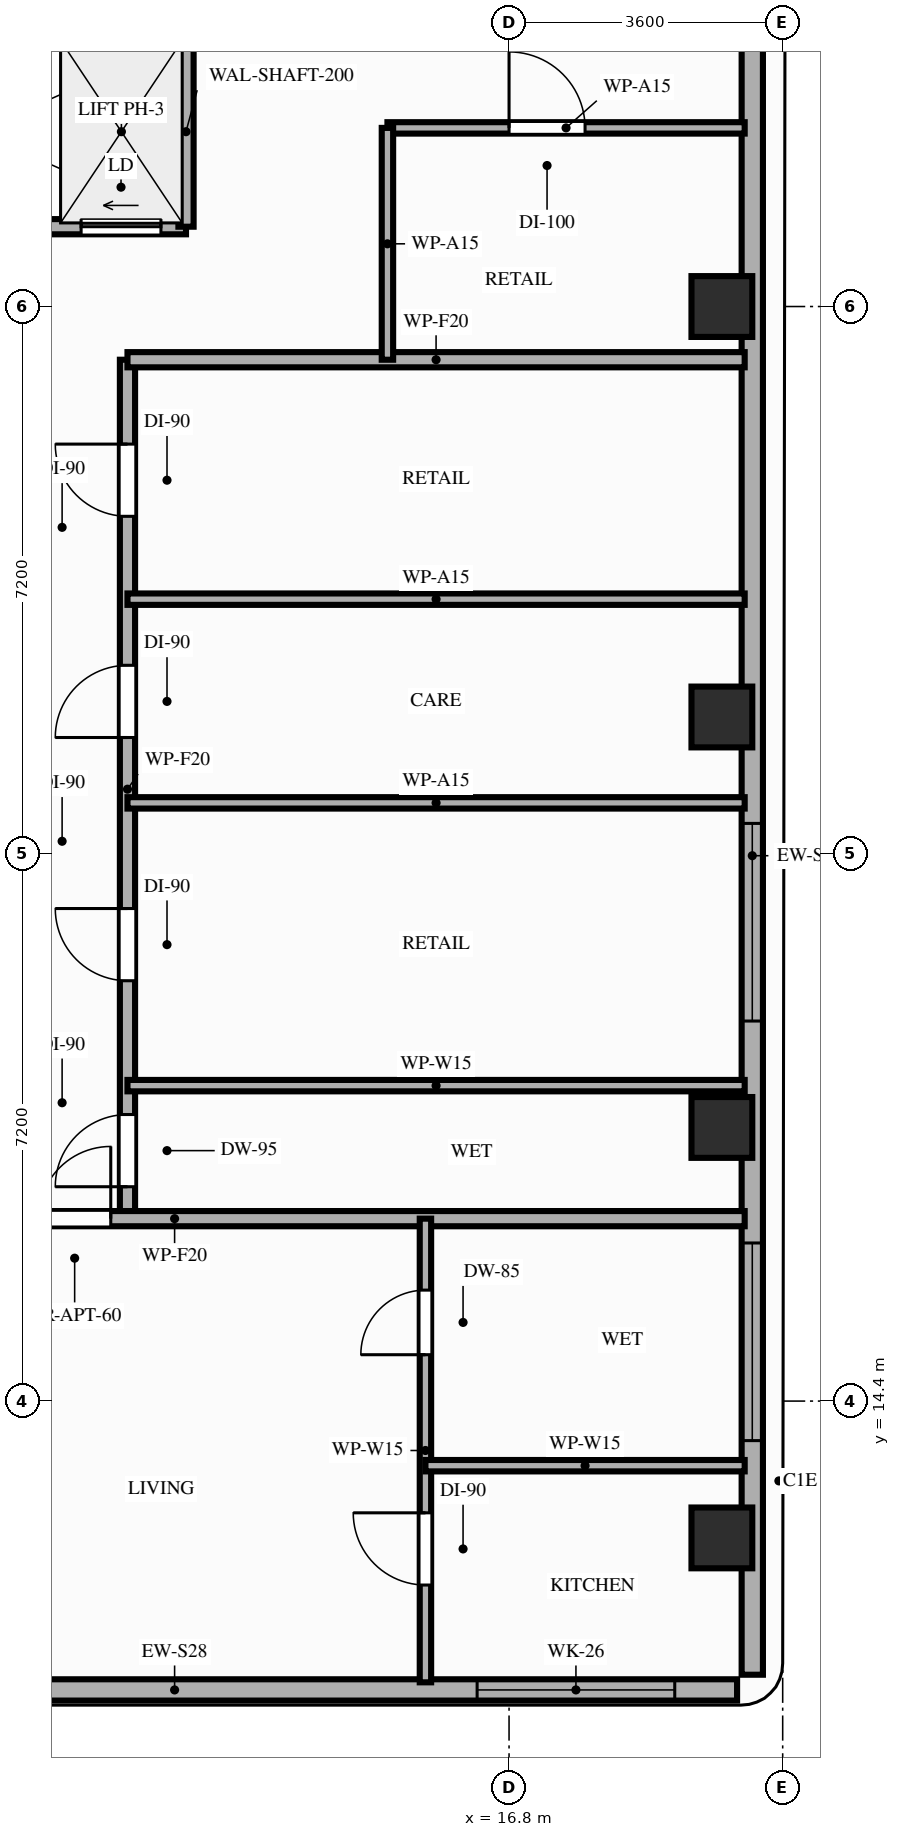
"""IFC4 building model, lengths in metres.
Left out: names, types, materials, properties, quantities, classifications, styles, units other than length and angle.
Written with IfcOpenShell. Run it as: python <this file> out.ifc"""

import sys

from ifc_helpers import new_model, si_unit, direction, frame, frame_2d, origin, origin_2d, place, context, subcontext, project, spatial, rectangle, extrude, element, fill, save


model = new_model("IFC4")
c1 = context("Model", 3, precision=1e-05, world=origin(), true_north=direction((0.0, 1.0)))
c2 = subcontext(c1, "Body", "Model", "MODEL_VIEW")
j1 = project(units=[si_unit("LENGTHUNIT", "METRE"), si_unit("PLANEANGLEUNIT", "RADIAN")], contexts=[c1])
p1 = place(None, origin())
s1 = spatial("IfcSite", under=j1, at=p1, CompositionType="ELEMENT")
p2 = place(p1, origin())
s2 = spatial("IfcBuilding", under=s1, at=p2, CompositionType="ELEMENT")
p3 = place(p2, frame((0.0, 0.0, 234.4)))
s3 = spatial("IfcBuildingStorey", under=s2, at=p3, CompositionType="ELEMENT", Elevation=234.4)
for number, where, z_axis, x_axis in (
    (1, (19.6, 12.6, 0.0), (0.0, 0.0, 1.0), (1.0, 0.0, 0.0)),
    (2, (19.6, 18.0, 0.0), (0.0, 0.0, 1.0), (1.0, 0.0, 0.0)),
    (3, (19.6, 23.4, 0.0), (0.0, 0.0, 1.0), (1.0, 0.0, 0.0)),
    (4, (19.6, 28.8, 0.0), (0.0, 0.0, 1.0), (1.0, 0.0, 0.0)),
):
    element("IfcColumn", number, at=place(p3, frame(where, z_axis=z_axis, x_axis=x_axis)), inside=s3, PredefinedType="COLUMN", context=c2, shape_type="SweptSolid", body=[
        extrude(rectangle(XDim=0.8, YDim=0.8, at=origin_2d()), origin(), (0.0, 0.0, 1.0), 3.2),
    ])
p4 = place(p3, frame((5.0, 10.6, 0.0), z_axis=(0.0, 0.0, 1.0), x_axis=(1.0, 0.0, 0.0)))
e5 = element("IfcWall", 5, at=p4, inside=s3, PredefinedType="STANDARD", context=c2, shape_type="SweptSolid", body=[
    extrude(rectangle(XDim=14.8, YDim=0.28, at=frame_2d((7.4, 0.0))), origin(), (0.0, 0.0, 1.0), 3.02),
])
p5 = place(p4, frame((11.38, 0.0, 0.85)))
e6 = element("IfcOpeningElement", 6, at=p5, cuts=e5, PredefinedType="OPENING", context=c2, shape_type="SweptSolid", body=[
    extrude(rectangle(XDim=2.6, YDim=1.92, at=frame_2d((1.3, 0.96))), frame((0.0, 0.15, 0.0), z_axis=(0.0, -1.0, 0.0), x_axis=(1.0, 0.0, 0.0)), (0.0, 0.0, 1.0), 0.3),
])
p6 = place(p3, frame((20.0, 10.8, 0.0), z_axis=(0.0, 0.0, 1.0), x_axis=(0.0, 1.0, 0.0)))
e7 = element("IfcWall", 7, at=p6, inside=s3, PredefinedType="STANDARD", context=c2, shape_type="SweptSolid", body=[
    extrude(rectangle(XDim=21.55, YDim=0.28, at=frame_2d((10.775, 0.0))), origin(), (0.0, 0.0, 1.0), 2.55),
])
p7 = place(p6, frame((3.08, 0.0, 0.85)))
e8 = element("IfcOpeningElement", 8, at=p7, cuts=e7, PredefinedType="OPENING", context=c2, shape_type="SweptSolid", body=[
    extrude(rectangle(XDim=2.6, YDim=1.45, at=frame_2d((1.3, 0.725))), frame((0.0, 0.15, 0.0), z_axis=(0.0, -1.0, 0.0), x_axis=(1.0, 0.0, 0.0)), (0.0, 0.0, 1.0), 0.3),
])
p8 = place(p6, frame((8.6, 0.0, 0.85)))
e9 = element("IfcOpeningElement", 9, at=p8, cuts=e7, PredefinedType="OPENING", context=c2, shape_type="SweptSolid", body=[
    extrude(rectangle(XDim=2.6, YDim=1.45, at=frame_2d((1.3, 0.725))), frame((0.0, 0.15, 0.0), z_axis=(0.0, -1.0, 0.0), x_axis=(1.0, 0.0, 0.0)), (0.0, 0.0, 1.0), 0.3),
])
p9 = place(p3, frame((7.0, 29.85, 0.0), z_axis=(0.0, 0.0, 1.0), x_axis=(1.0, 0.0, 0.0)))
e10 = element("IfcWall", 10, at=p9, inside=s3, PredefinedType="MOVABLE", context=c2, shape_type="SweptSolid", body=[
    extrude(rectangle(XDim=5.55, YDim=0.2, at=frame_2d((2.775, 0.0))), origin(), (0.0, 0.0, 1.0), 3.02),
])
p10 = place(p9, frame((0.38, 0.0, 0.0)))
e11 = element("IfcOpeningElement", 11, at=p10, cuts=e10, PredefinedType="OPENING", context=c2, shape_type="SweptSolid", body=[
    extrude(rectangle(XDim=1.05, YDim=2.15, at=frame_2d((0.525, 1.075))), frame((0.0, 0.11, 0.0), z_axis=(0.0, -1.0, 0.0), x_axis=(1.0, 0.0, 0.0)), (0.0, 0.0, 1.0), 0.22),
])
p11 = place(p9, frame((2.28, 0.0, 0.0)))
e12 = element("IfcOpeningElement", 12, at=p11, cuts=e10, PredefinedType="OPENING", context=c2, shape_type="SweptSolid", body=[
    extrude(rectangle(XDim=1.05, YDim=2.15, at=frame_2d((0.525, 1.075))), frame((0.0, 0.11, 0.0), z_axis=(0.0, -1.0, 0.0), x_axis=(1.0, 0.0, 0.0)), (0.0, 0.0, 1.0), 0.22),
])
p12 = place(p9, frame((4.17, 0.0, 0.0)))
e13 = element("IfcOpeningElement", 13, at=p12, cuts=e10, PredefinedType="OPENING", context=c2, shape_type="SweptSolid", body=[
    extrude(rectangle(XDim=1.05, YDim=2.15, at=frame_2d((0.525, 1.075))), frame((0.0, 0.11, 0.0), z_axis=(0.0, -1.0, 0.0), x_axis=(1.0, 0.0, 0.0)), (0.0, 0.0, 1.0), 0.22),
])
p13 = place(p3, frame((12.55, 29.85, 0.0), z_axis=(0.0, 0.0, 1.0), x_axis=(0.0, 1.0, 0.0)))
e14 = element("IfcWall", 14, at=p13, inside=s3, PredefinedType="MOVABLE", context=c2, shape_type="SweptSolid", body=[
    extrude(rectangle(XDim=2.5, YDim=0.2, at=frame_2d((1.25, 0.0))), origin(), (0.0, 0.0, 1.0), 3.02),
])
p14 = place(p3, frame((11.78, 16.8, 0.0), z_axis=(0.0, 0.0, 1.0), x_axis=(0.0, 1.0, 0.0)))
e15 = element("IfcWall", 15, at=p14, inside=s3, PredefinedType="PARTITIONING", context=c2, shape_type="SweptSolid", body=[
    extrude(rectangle(XDim=11.3, YDim=0.2, at=frame_2d((5.65, 0.0))), origin(), (0.0, 0.0, 1.0), 2.55),
])
p15 = place(p14, frame((0.42, 0.0, 0.0)))
e16 = element("IfcOpeningElement", 16, at=p15, cuts=e15, PredefinedType="OPENING", context=c2, shape_type="SweptSolid", body=[
    extrude(rectangle(XDim=0.95, YDim=2.1, at=frame_2d((0.475, 1.05))), frame((0.0, 0.11, 0.0), z_axis=(0.0, -1.0, 0.0), x_axis=(1.0, 0.0, 0.0)), (0.0, 0.0, 1.0), 0.22),
])
p16 = place(p14, frame((3.13, 0.0, 0.0)))
e17 = element("IfcOpeningElement", 17, at=p16, cuts=e15, PredefinedType="OPENING", context=c2, shape_type="SweptSolid", body=[
    extrude(rectangle(XDim=0.95, YDim=2.15, at=frame_2d((0.475, 1.075))), frame((0.0, 0.11, 0.0), z_axis=(0.0, -1.0, 0.0), x_axis=(1.0, 0.0, 0.0)), (0.0, 0.0, 1.0), 0.22),
])
p17 = place(p14, frame((6.33, 0.0, 0.0)))
e18 = element("IfcOpeningElement", 18, at=p17, cuts=e15, PredefinedType="OPENING", context=c2, shape_type="SweptSolid", body=[
    extrude(rectangle(XDim=0.95, YDim=2.15, at=frame_2d((0.475, 1.075))), frame((0.0, 0.11, 0.0), z_axis=(0.0, -1.0, 0.0), x_axis=(1.0, 0.0, 0.0)), (0.0, 0.0, 1.0), 0.22),
])
p18 = place(p14, frame((9.24, 0.0, 0.0)))
e19 = element("IfcOpeningElement", 19, at=p18, cuts=e15, PredefinedType="OPENING", context=c2, shape_type="SweptSolid", body=[
    extrude(rectangle(XDim=0.95, YDim=2.15, at=frame_2d((0.475, 1.075))), frame((0.0, 0.11, 0.0), z_axis=(0.0, -1.0, 0.0), x_axis=(1.0, 0.0, 0.0)), (0.0, 0.0, 1.0), 0.22),
])
p19 = place(p3, frame((4.9, 16.8, 0.0), z_axis=(0.0, 0.0, 1.0), x_axis=(1.0, 0.0, 0.0)))
e20 = element("IfcWall", 20, at=p19, inside=s3, PredefinedType="PARTITIONING", context=c2, shape_type="SweptSolid", body=[
    extrude(rectangle(XDim=15.0, YDim=0.2, at=frame_2d((7.5, 0.0))), origin(), (0.0, 0.0, 1.0), 2.55),
])
p20 = place(p19, frame((5.71, 0.0, 0.0)))
e21 = element("IfcOpeningElement", 21, at=p20, cuts=e20, PredefinedType="OPENING", context=c2, shape_type="SweptSolid", body=[
    extrude(rectangle(XDim=0.95, YDim=2.15, at=frame_2d((0.475, 1.075))), frame((0.0, 0.11, 0.0), z_axis=(0.0, -1.0, 0.0), x_axis=(1.0, 0.0, 0.0)), (0.0, 0.0, 1.0), 0.22),
])
p21 = place(p3, frame((11.78, 28.1, 0.0), z_axis=(0.0, 0.0, 1.0), x_axis=(1.0, 0.0, 0.0)))
e22 = element("IfcWall", 22, at=p21, inside=s3, PredefinedType="PARTITIONING", context=c2, shape_type="SweptSolid", body=[
    extrude(rectangle(XDim=8.12, YDim=0.2, at=frame_2d((4.06, 0.0))), origin(), (0.0, 0.0, 1.0), 2.55),
])
p22 = place(p3, frame((15.2, 31.15, 0.0), z_axis=(0.0, 0.0, 1.0), x_axis=(1.0, 0.0, 0.0)))
e23 = element("IfcWall", 23, at=p22, inside=s3, PredefinedType="PARTITIONING", context=c2, shape_type="SweptSolid", body=[
    extrude(rectangle(XDim=4.7, YDim=0.15, at=frame_2d((2.35, 0.0))), origin(), (0.0, 0.0, 1.0), 2.55),
])
p23 = place(p22, frame((1.6, 0.0, 0.0)))
e24 = element("IfcOpeningElement", 24, at=p23, cuts=e23, PredefinedType="OPENING", context=c2, shape_type="SweptSolid", body=[
    extrude(rectangle(XDim=1.0, YDim=2.15, at=frame_2d((0.5, 1.075))), frame((0.0, 0.085, 0.0), z_axis=(0.0, -1.0, 0.0), x_axis=(1.0, 0.0, 0.0)), (0.0, 0.0, 1.0), 0.17),
])
p24 = place(p3, frame((15.2, 28.1, 0.0), z_axis=(0.0, 0.0, 1.0), x_axis=(0.0, 1.0, 0.0)))
e25 = element("IfcWall", 25, at=p24, inside=s3, PredefinedType="PARTITIONING", context=c2, shape_type="SweptSolid", body=[
    extrude(rectangle(XDim=3.05, YDim=0.15, at=frame_2d((1.525, 0.0))), origin(), (0.0, 0.0, 1.0), 2.55),
])
p25 = place(p3, frame((15.7, 10.7, 0.0), z_axis=(0.0, 0.0, 1.0), x_axis=(0.0, 1.0, 0.0)))
e26 = element("IfcWall", 26, at=p25, inside=s3, PredefinedType="PARTITIONING", context=c2, shape_type="SweptSolid", body=[
    extrude(rectangle(XDim=6.1, YDim=0.15, at=frame_2d((3.05, 0.0))), origin(), (0.0, 0.0, 1.0), 2.55),
])
p26 = place(p25, frame((1.28, 0.0, 0.0)))
e27 = element("IfcOpeningElement", 27, at=p26, cuts=e26, PredefinedType="OPENING", context=c2, shape_type="SweptSolid", body=[
    extrude(rectangle(XDim=0.95, YDim=2.15, at=frame_2d((0.475, 1.075))), frame((0.0, 0.085, 0.0), z_axis=(0.0, -1.0, 0.0), x_axis=(1.0, 0.0, 0.0)), (0.0, 0.0, 1.0), 0.17),
])
p27 = place(p25, frame((4.31, 0.0, 0.0)))
e28 = element("IfcOpeningElement", 28, at=p27, cuts=e26, PredefinedType="OPENING", context=c2, shape_type="SweptSolid", body=[
    extrude(rectangle(XDim=0.85, YDim=2.1, at=frame_2d((0.425, 1.05))), frame((0.0, 0.085, 0.0), z_axis=(0.0, -1.0, 0.0), x_axis=(1.0, 0.0, 0.0)), (0.0, 0.0, 1.0), 0.17),
])
p28 = place(p3, frame((15.7, 13.55, 0.0), z_axis=(0.0, 0.0, 1.0), x_axis=(1.0, 0.0, 0.0)))
e29 = element("IfcWall", 29, at=p28, inside=s3, PredefinedType="PARTITIONING", context=c2, shape_type="SweptSolid", body=[
    extrude(rectangle(XDim=4.2, YDim=0.15, at=frame_2d((2.1, 0.0))), origin(), (0.0, 0.0, 1.0), 2.55),
])
for number, where, z_axis, x_axis in (
    (30, (11.78, 18.55, 0.0), (0.0, 0.0, 1.0), (1.0, 0.0, 0.0)),
    (31, (11.78, 22.27, 0.0), (0.0, 0.0, 1.0), (1.0, 0.0, 0.0)),
    (32, (11.78, 24.95, 0.0), (0.0, 0.0, 1.0), (1.0, 0.0, 0.0)),
):
    element("IfcWall", number, at=place(p3, frame(where, z_axis=z_axis, x_axis=x_axis)), inside=s3, PredefinedType="PARTITIONING", context=c2, shape_type="SweptSolid", body=[
        extrude(rectangle(XDim=8.12, YDim=0.15, at=frame_2d((4.06, 0.0))), origin(), (0.0, 0.0, 1.0), 2.55),
    ])
p29 = place(p5, origin())
e33 = element("IfcWindow", 33, at=p29, inside=s3, PartitioningType="SINGLE_PANEL", PredefinedType="WINDOW", context=c2, shape_type="SweptSolid", body=[
    extrude(rectangle(XDim=2.6, YDim=1.92, at=frame_2d((1.3, 0.96))), frame((0.0, 0.03, 0.0), z_axis=(0.0, -1.0, 0.0), x_axis=(1.0, 0.0, 0.0)), (0.0, 0.0, 1.0), 0.06),
])
fill(e6, e33)
p30 = place(p7, origin())
e34 = element("IfcWindow", 34, at=p30, inside=s3, PartitioningType="SINGLE_PANEL", PredefinedType="WINDOW", context=c2, shape_type="SweptSolid", body=[
    extrude(rectangle(XDim=2.6, YDim=1.45, at=frame_2d((1.3, 0.725))), frame((0.0, 0.03, 0.0), z_axis=(0.0, -1.0, 0.0), x_axis=(1.0, 0.0, 0.0)), (0.0, 0.0, 1.0), 0.06),
])
fill(e8, e34)
p31 = place(p8, origin())
e35 = element("IfcWindow", 35, at=p31, inside=s3, PartitioningType="SINGLE_PANEL", PredefinedType="WINDOW", context=c2, shape_type="SweptSolid", body=[
    extrude(rectangle(XDim=2.6, YDim=1.45, at=frame_2d((1.3, 0.725))), frame((0.0, 0.03, 0.0), z_axis=(0.0, -1.0, 0.0), x_axis=(1.0, 0.0, 0.0)), (0.0, 0.0, 1.0), 0.06),
])
fill(e9, e35)
p32 = place(p12, origin())
e36 = element("IfcDoor", 36, at=p32, inside=s3, OperationType="SLIDING_TO_LEFT", PredefinedType="DOOR", context=c2, shape_type="SweptSolid", body=[
    extrude(rectangle(XDim=1.05, YDim=2.15, at=frame_2d((0.525, 1.075))), frame((0.0, 0.025, 0.0), z_axis=(0.0, -1.0, 0.0), x_axis=(1.0, 0.0, 0.0)), (0.0, 0.0, 1.0), 0.05),
])
fill(e13, e36)
p33 = place(p23, origin())
e37 = element("IfcDoor", 37, at=p33, inside=s3, OperationType="SINGLE_SWING_LEFT", PredefinedType="DOOR", context=c2, shape_type="SweptSolid", body=[
    extrude(rectangle(XDim=1.0, YDim=2.15, at=frame_2d((0.5, 1.075))), frame((0.0, 0.025, 0.0), z_axis=(0.0, -1.0, 0.0), x_axis=(1.0, 0.0, 0.0)), (0.0, 0.0, 1.0), 0.05),
])
fill(e24, e37)
p34 = place(p20, origin())
e38 = element("IfcDoor", 38, at=p34, inside=s3, OperationType="SINGLE_SWING_RIGHT", PredefinedType="DOOR", context=c2, shape_type="SweptSolid", body=[
    extrude(rectangle(XDim=0.95, YDim=2.15, at=frame_2d((0.475, 1.075))), frame((0.0, 0.025, 0.0), z_axis=(0.0, -1.0, 0.0), x_axis=(1.0, 0.0, 0.0)), (0.0, 0.0, 1.0), 0.05),
])
fill(e21, e38)
p35 = place(p26, origin())
e39 = element("IfcDoor", 39, at=p35, inside=s3, OperationType="SINGLE_SWING_RIGHT", PredefinedType="DOOR", context=c2, shape_type="SweptSolid", body=[
    extrude(rectangle(XDim=0.95, YDim=2.15, at=frame_2d((0.475, 1.075))), frame((0.0, 0.025, 0.0), z_axis=(0.0, -1.0, 0.0), x_axis=(1.0, 0.0, 0.0)), (0.0, 0.0, 1.0), 0.05),
])
fill(e27, e39)
p36 = place(p27, origin())
e40 = element("IfcDoor", 40, at=p36, inside=s3, OperationType="SINGLE_SWING_LEFT", PredefinedType="DOOR", context=c2, shape_type="SweptSolid", body=[
    extrude(rectangle(XDim=0.85, YDim=2.1, at=frame_2d((0.425, 1.05))), frame((0.0, 0.025, 0.0), z_axis=(0.0, -1.0, 0.0), x_axis=(1.0, 0.0, 0.0)), (0.0, 0.0, 1.0), 0.05),
])
fill(e28, e40)
p37 = place(p15, origin())
e41 = element("IfcDoor", 41, at=p37, inside=s3, OperationType="SINGLE_SWING_LEFT", PredefinedType="DOOR", context=c2, shape_type="SweptSolid", body=[
    extrude(rectangle(XDim=0.95, YDim=2.1, at=frame_2d((0.475, 1.05))), frame((0.0, 0.025, 0.0), z_axis=(0.0, -1.0, 0.0), x_axis=(1.0, 0.0, 0.0)), (0.0, 0.0, 1.0), 0.05),
])
fill(e16, e41)
p38 = place(p16, origin())
e42 = element("IfcDoor", 42, at=p38, inside=s3, OperationType="SINGLE_SWING_RIGHT", PredefinedType="DOOR", context=c2, shape_type="SweptSolid", body=[
    extrude(rectangle(XDim=0.95, YDim=2.15, at=frame_2d((0.475, 1.075))), frame((0.0, 0.025, 0.0), z_axis=(0.0, -1.0, 0.0), x_axis=(1.0, 0.0, 0.0)), (0.0, 0.0, 1.0), 0.05),
])
fill(e17, e42)
p39 = place(p17, origin())
e43 = element("IfcDoor", 43, at=p39, inside=s3, OperationType="SINGLE_SWING_LEFT", PredefinedType="DOOR", context=c2, shape_type="SweptSolid", body=[
    extrude(rectangle(XDim=0.95, YDim=2.15, at=frame_2d((0.475, 1.075))), frame((0.0, 0.025, 0.0), z_axis=(0.0, -1.0, 0.0), x_axis=(1.0, 0.0, 0.0)), (0.0, 0.0, 1.0), 0.05),
])
fill(e18, e43)
p40 = place(p18, origin())
e44 = element("IfcDoor", 44, at=p40, inside=s3, OperationType="SINGLE_SWING_RIGHT", PredefinedType="DOOR", context=c2, shape_type="SweptSolid", body=[
    extrude(rectangle(XDim=0.95, YDim=2.15, at=frame_2d((0.475, 1.075))), frame((0.0, 0.025, 0.0), z_axis=(0.0, -1.0, 0.0), x_axis=(1.0, 0.0, 0.0)), (0.0, 0.0, 1.0), 0.05),
])
fill(e19, e44)
save(model, sys.argv[1])
